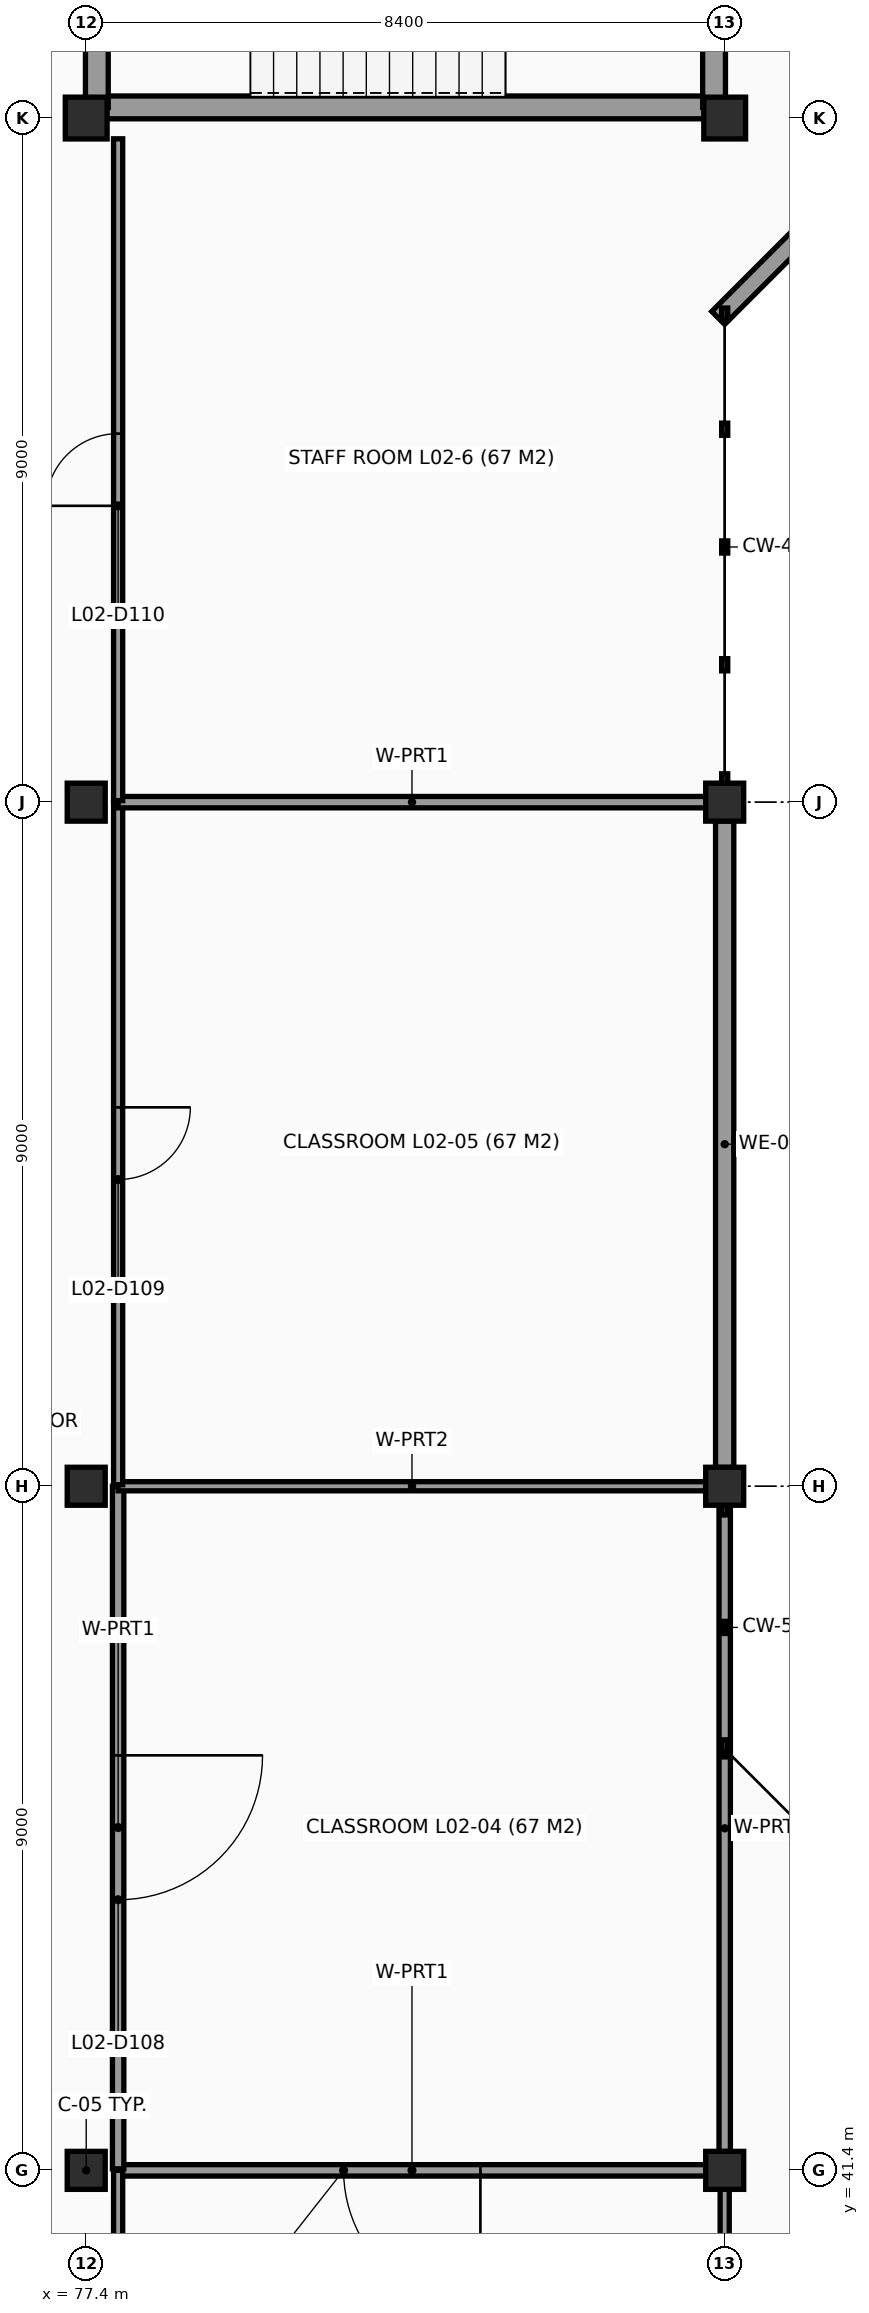
"""IFC4 building model, lengths in metres.
Left out: names, types, materials, properties, quantities, classifications, styles, units other than length and angle.
Written with IfcOpenShell. Run it as: python <this file> out.ifc"""

import sys

from ifc_helpers import new_model, si_unit, direction, frame, frame_2d, origin, origin_2d, place, context, subcontext, project, spatial, rectangle, extrude, element, fill, save


model = new_model("IFC4")
c1 = context("Model", 3, precision=1e-05, world=origin(), true_north=direction((0.0, 1.0)))
c2 = subcontext(c1, "Body", "Model", "MODEL_VIEW")
j1 = project(units=[si_unit("LENGTHUNIT", "METRE"), si_unit("PLANEANGLEUNIT", "RADIAN")], contexts=[c1])
p1 = place(None, origin())
s1 = spatial("IfcSite", under=j1, at=p1, CompositionType="ELEMENT")
p2 = place(p1, origin())
s2 = spatial("IfcBuilding", under=s1, at=p2, CompositionType="ELEMENT")
p3 = place(p2, frame((0.0, 0.0, 7.8)))
s3 = spatial("IfcBuildingStorey", under=s2, at=p3, CompositionType="ELEMENT", Elevation=7.8)
for number, where, z_axis, x_axis in (
    (1, (77.4, 41.4, 0.0), (0.0, 0.0, 1.0), (1.0, 0.0, 0.0)),
    (2, (77.4, 50.4, 0.0), (0.0, 0.0, 1.0), (1.0, 0.0, 0.0)),
    (3, (77.4, 59.4, 0.0), (0.0, 0.0, 1.0), (1.0, 0.0, 0.0)),
):
    element("IfcColumn", number, at=place(p3, frame(where, z_axis=z_axis, x_axis=x_axis)), inside=s3, PredefinedType="COLUMN", context=c2, shape_type="SweptSolid", body=[
        extrude(rectangle(XDim=0.5, YDim=0.5, at=origin_2d()), origin(), (0.0, 0.0, 1.0), 3.6),
    ])
p4 = place(p3, frame((77.4, 68.4, 0.0), z_axis=(0.0, 0.0, 1.0), x_axis=(1.0, 0.0, 0.0)))
e4 = element("IfcColumn", 4, at=p4, inside=s3, PredefinedType="COLUMN", context=c2, shape_type="SweptSolid", body=[
    extrude(rectangle(XDim=0.55, YDim=0.55, at=origin_2d()), origin(), (0.0, 0.0, 1.0), 3.6),
])
for number, where, z_axis, x_axis in (
    (5, (85.8, 41.4, 0.0), (0.0, 0.0, 1.0), (1.0, 0.0, 0.0)),
    (6, (85.8, 50.4, 0.0), (0.0, 0.0, 1.0), (1.0, 0.0, 0.0)),
    (7, (85.8, 59.4, 0.0), (0.0, 0.0, 1.0), (1.0, 0.0, 0.0)),
):
    element("IfcColumn", number, at=place(p3, frame(where, z_axis=z_axis, x_axis=x_axis)), inside=s3, PredefinedType="COLUMN", context=c2, shape_type="SweptSolid", body=[
        extrude(rectangle(XDim=0.5, YDim=0.5, at=origin_2d()), origin(), (0.0, 0.0, 1.0), 3.6),
    ])
p5 = place(p3, frame((85.8, 68.4, 0.0), z_axis=(0.0, 0.0, 1.0), x_axis=(1.0, 0.0, 0.0)))
e8 = element("IfcColumn", 8, at=p5, inside=s3, PredefinedType="COLUMN", context=c2, shape_type="SweptSolid", body=[
    extrude(rectangle(XDim=0.55, YDim=0.55, at=origin_2d()), origin(), (0.0, 0.0, 1.0), 3.6),
])
p6 = place(p3, frame((91.429, 71.485, 0.0), z_axis=(0.0, 0.0, 1.0), x_axis=(-0.707106781187, -0.707106781187, 0.0)))
e9 = element("IfcWall", 9, at=p6, inside=s3, PredefinedType="SOLIDWALL", context=c2, shape_type="SweptSolid", body=[
    extrude(rectangle(XDim=8.081, YDim=0.24, at=frame_2d((4.04, 0.0))), origin(), (0.0, 0.0, 1.0), 2.64),
])
p7 = place(p3, frame((85.8, 59.152, 0.0), z_axis=(0.0, 0.0, 1.0), x_axis=(0.0, -1.0, 0.0)))
e10 = element("IfcWall", 10, at=p7, inside=s3, PredefinedType="SOLIDWALL", context=c2, shape_type="SweptSolid", body=[
    extrude(rectangle(XDim=8.504, YDim=0.24, at=frame_2d((4.252, 0.0))), origin(), (0.0, 0.0, 1.0), 2.64),
])
p8 = place(p3, frame((77.54, 68.54, 0.0), z_axis=(0.0, 0.0, 1.0), x_axis=(1.0, 0.0, 0.0)))
e11 = element("IfcWall", 11, at=p8, inside=s3, PredefinedType="SHEAR", context=c2, shape_type="SweptSolid", body=[
    extrude(rectangle(XDim=8.12, YDim=0.3, at=frame_2d((4.06, 0.0))), origin(), (0.0, 0.0, 1.0), 3.6),
])
for number, where, z_axis, x_axis in (
    (12, (85.66, 68.54, 0.0), (0.0, 0.0, 1.0), (0.0, 1.0, 0.0)),
    (13, (77.54, 72.74, 0.0), (0.0, 0.0, 1.0), (0.0, -1.0, 0.0)),
):
    element("IfcWall", number, at=place(p3, frame(where, z_axis=z_axis, x_axis=x_axis)), inside=s3, PredefinedType="SHEAR", context=c2, shape_type="SweptSolid", body=[
        extrude(rectangle(XDim=4.2, YDim=0.3, at=frame_2d((2.1, 0.0))), origin(), (0.0, 0.0, 1.0), 3.6),
    ])
p9 = place(p3, frame((77.82, 41.4, 0.0), z_axis=(0.0, 0.0, 1.0), x_axis=(1.0, 0.0, 0.0)))
e14 = element("IfcWall", 14, at=p9, inside=s3, PredefinedType="PARTITIONING", context=c2, shape_type="SweptSolid", body=[
    extrude(rectangle(XDim=7.732, YDim=0.15, at=frame_2d((3.866, 0.0))), origin(), (0.0, 0.0, 1.0), 2.95),
])
p10 = place(p9, frame((2.966, 0.0, 0.0)))
e15 = element("IfcOpeningElement", 15, at=p10, cuts=e14, PredefinedType="OPENING", context=c2, shape_type="SweptSolid", body=[
    extrude(rectangle(XDim=1.8, YDim=2.25, at=frame_2d((0.9, 1.125))), frame((0.0, 0.085, 0.0), z_axis=(0.0, -1.0, 0.0), x_axis=(1.0, 0.0, 0.0)), (0.0, 0.0, 1.0), 0.17),
])
p11 = place(p3, frame((85.8, 41.152, 0.0), z_axis=(0.0, 0.0, 1.0), x_axis=(0.0, -1.0, 0.0)))
e16 = element("IfcWall", 16, at=p11, inside=s3, PredefinedType="PARTITIONING", context=c2, shape_type="SweptSolid", body=[
    extrude(rectangle(XDim=8.429, YDim=0.12, at=frame_2d((4.215, 0.0))), origin(), (0.0, 0.0, 1.0), 2.92),
])
p12 = place(p3, frame((77.82, 32.723, 0.0), z_axis=(0.0, 0.0, 1.0), x_axis=(0.0, 1.0, 0.0)))
e17 = element("IfcWall", 17, at=p12, inside=s3, PredefinedType="PARTITIONING", context=c2, shape_type="SweptSolid", body=[
    extrude(rectangle(XDim=8.677, YDim=0.12, at=frame_2d((4.338, 0.0))), origin(), (0.0, 0.0, 1.0), 2.95),
])
p13 = place(p3, frame((77.82, 41.42, 0.0), z_axis=(0.0, 0.0, 1.0), x_axis=(0.0, 1.0, 0.0)))
e18 = element("IfcWall", 18, at=p13, inside=s3, PredefinedType="PARTITIONING", context=c2, shape_type="SweptSolid", body=[
    extrude(rectangle(XDim=8.98, YDim=0.15, at=frame_2d((4.49, 0.0))), origin(), (0.0, 0.0, 1.0), 2.59),
])
p14 = place(p13, frame((3.54, 0.0, 0.0)))
e19 = element("IfcOpeningElement", 19, at=p14, cuts=e18, PredefinedType="OPENING", context=c2, shape_type="SweptSolid", body=[
    extrude(rectangle(XDim=1.9, YDim=2.3, at=frame_2d((0.95, 1.15))), frame((0.0, 0.085, 0.0), z_axis=(0.0, -1.0, 0.0), x_axis=(1.0, 0.0, 0.0)), (0.0, 0.0, 1.0), 0.17),
])
p15 = place(p3, frame((77.82, 50.4, 0.0), z_axis=(0.0, 0.0, 1.0), x_axis=(1.0, 0.0, 0.0)))
e20 = element("IfcWall", 20, at=p15, inside=s3, PredefinedType="PARTITIONING", context=c2, shape_type="SweptSolid", body=[
    extrude(rectangle(XDim=7.732, YDim=0.12, at=frame_2d((3.866, 0.0))), origin(), (0.0, 0.0, 1.0), 2.59),
])
p16 = place(p3, frame((85.8, 50.152, 0.0), z_axis=(0.0, 0.0, 1.0), x_axis=(0.0, -1.0, 0.0)))
e21 = element("IfcWall", 21, at=p16, inside=s3, PredefinedType="PARTITIONING", context=c2, shape_type="SweptSolid", body=[
    extrude(rectangle(XDim=8.504, YDim=0.15, at=frame_2d((4.252, 0.0))), origin(), (0.0, 0.0, 1.0), 2.98),
])
p17 = place(p3, frame((77.82, 50.42, 0.0), z_axis=(0.0, 0.0, 1.0), x_axis=(0.0, 1.0, 0.0)))
e22 = element("IfcWall", 22, at=p17, inside=s3, PredefinedType="PARTITIONING", context=c2, shape_type="SweptSolid", body=[
    extrude(rectangle(XDim=8.98, YDim=0.12, at=frame_2d((4.49, 0.0))), origin(), (0.0, 0.0, 1.0), 2.59),
])
p18 = place(p17, frame((4.015, 0.0, 0.0)))
e23 = element("IfcOpeningElement", 23, at=p18, cuts=e22, PredefinedType="OPENING", context=c2, shape_type="SweptSolid", body=[
    extrude(rectangle(XDim=0.95, YDim=2.1, at=frame_2d((0.475, 1.05))), frame((0.0, 0.07, 0.0), z_axis=(0.0, -1.0, 0.0), x_axis=(1.0, 0.0, 0.0)), (0.0, 0.0, 1.0), 0.14),
])
p19 = place(p3, frame((77.82, 59.4, 0.0), z_axis=(0.0, 0.0, 1.0), x_axis=(1.0, 0.0, 0.0)))
e24 = element("IfcWall", 24, at=p19, inside=s3, PredefinedType="PARTITIONING", context=c2, shape_type="SweptSolid", body=[
    extrude(rectangle(XDim=7.732, YDim=0.15, at=frame_2d((3.866, 0.0))), origin(), (0.0, 0.0, 1.0), 2.69),
])
p20 = place(p3, frame((77.82, 59.42, 0.0), z_axis=(0.0, 0.0, 1.0), x_axis=(0.0, 1.0, 0.0)))
e25 = element("IfcWall", 25, at=p20, inside=s3, PredefinedType="PARTITIONING", context=c2, shape_type="SweptSolid", body=[
    extrude(rectangle(XDim=8.707, YDim=0.12, at=frame_2d((4.354, 0.0))), origin(), (0.0, 0.0, 1.0), 2.69),
])
p21 = place(p20, frame((3.878, 0.0, 0.0)))
e26 = element("IfcOpeningElement", 26, at=p21, cuts=e25, PredefinedType="OPENING", context=c2, shape_type="SweptSolid", body=[
    extrude(rectangle(XDim=0.95, YDim=2.1, at=frame_2d((0.475, 1.05))), frame((0.0, 0.07, 0.0), z_axis=(0.0, -1.0, 0.0), x_axis=(1.0, 0.0, 0.0)), (0.0, 0.0, 1.0), 0.14),
])
p22 = place(p10, origin())
e27 = element("IfcDoor", 27, at=p22, inside=s3, OperationType="DOUBLE_DOOR_SINGLE_SWING", PredefinedType="DOOR", context=c2, shape_type="SweptSolid", body=[
    extrude(rectangle(XDim=1.8, YDim=2.25, at=frame_2d((0.9, 1.125))), frame((0.0, 0.025, 0.0), z_axis=(0.0, -1.0, 0.0), x_axis=(1.0, 0.0, 0.0)), (0.0, 0.0, 1.0), 0.05),
])
fill(e15, e27)
p23 = place(p14, origin())
e28 = element("IfcDoor", 28, at=p23, inside=s3, OperationType="DOUBLE_DOOR_SINGLE_SWING", PredefinedType="DOOR", context=c2, shape_type="SweptSolid", body=[
    extrude(rectangle(XDim=1.9, YDim=2.3, at=frame_2d((0.95, 1.15))), frame((0.0, 0.025, 0.0), z_axis=(0.0, -1.0, 0.0), x_axis=(1.0, 0.0, 0.0)), (0.0, 0.0, 1.0), 0.05),
])
fill(e19, e28)
p24 = place(p18, origin())
e29 = element("IfcDoor", 29, at=p24, inside=s3, OperationType="SINGLE_SWING_RIGHT", PredefinedType="DOOR", context=c2, shape_type="SweptSolid", body=[
    extrude(rectangle(XDim=0.95, YDim=2.1, at=frame_2d((0.475, 1.05))), frame((0.0, 0.025, 0.0), z_axis=(0.0, -1.0, 0.0), x_axis=(1.0, 0.0, 0.0)), (0.0, 0.0, 1.0), 0.05),
])
fill(e23, e29)
p25 = place(p21, origin())
e30 = element("IfcDoor", 30, at=p25, inside=s3, OperationType="SINGLE_SWING_LEFT", PredefinedType="DOOR", context=c2, shape_type="SweptSolid", body=[
    extrude(rectangle(XDim=0.95, YDim=2.1, at=frame_2d((0.475, 1.05))), frame((0.0, 0.025, 0.0), z_axis=(0.0, -1.0, 0.0), x_axis=(1.0, 0.0, 0.0)), (0.0, 0.0, 1.0), 0.05),
])
fill(e26, e30)
save(model, sys.argv[1])
